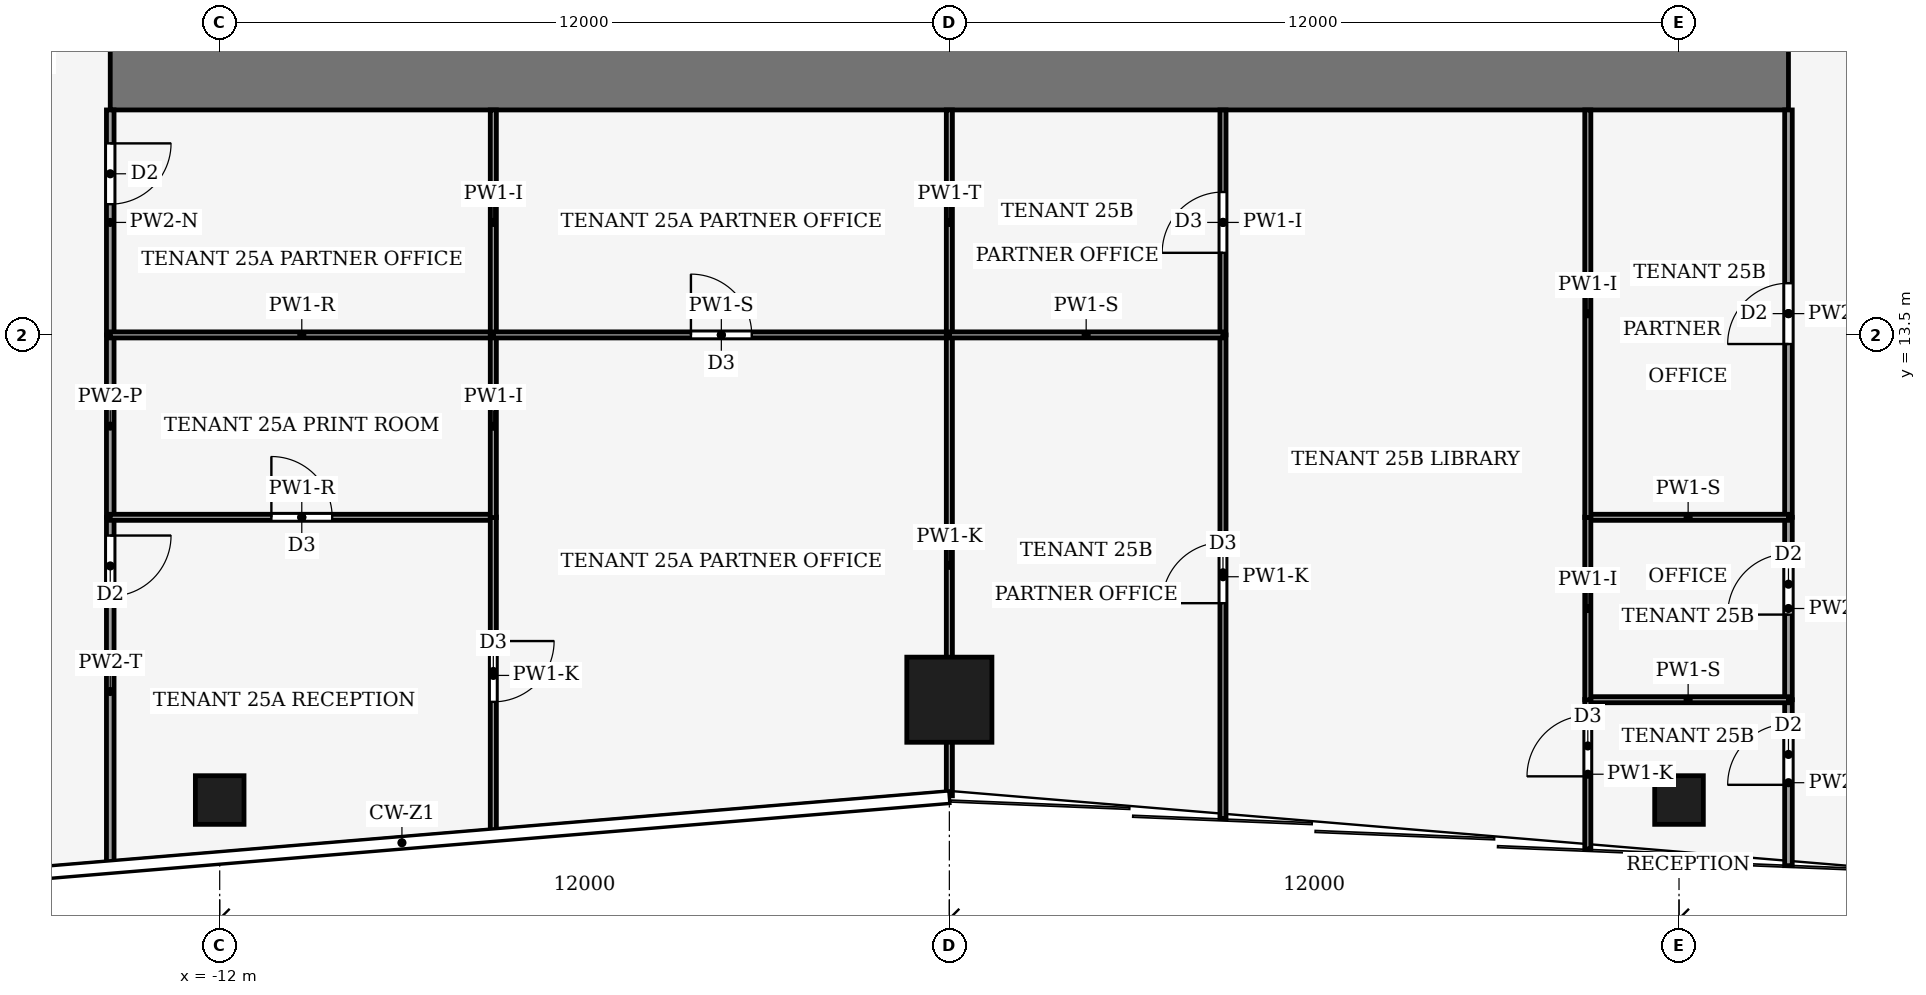
"""IFC4 building model, lengths in metres.
Left out: names, types, materials, properties, quantities, classifications, styles, units other than length and angle.
Written with IfcOpenShell. Run it as: python <this file> out.ifc"""

import sys

from ifc_helpers import new_model, si_unit, direction, frame, frame_2d, origin, origin_2d, place, context, subcontext, project, spatial, rectangle, hollow_rectangle, extrude, element, fill, save


model = new_model("IFC4")
c1 = context("Model", 3, precision=1e-05, world=origin(), true_north=direction((0.0, 1.0)))
c2 = subcontext(c1, "Body", "Model", "MODEL_VIEW")
j1 = project(units=[si_unit("LENGTHUNIT", "METRE"), si_unit("PLANEANGLEUNIT", "RADIAN")], contexts=[c1])
p1 = place(None, origin())
s1 = spatial("IfcSite", under=j1, at=p1, CompositionType="ELEMENT")
p2 = place(p1, origin())
s2 = spatial("IfcBuilding", under=s1, at=p2, CompositionType="ELEMENT")
p3 = place(p2, frame((0.0, 0.0, 110.0)))
s3 = spatial("IfcBuildingStorey", under=s2, at=p3, CompositionType="ELEMENT", Elevation=110.0)
p4 = place(p3, frame((-13.8, 17.8, -0.13), z_axis=(0.0, 0.0, 1.0), x_axis=(1.0, 0.0, 0.0)))
e1 = element("IfcWall", 1, at=p4, inside=s3, PredefinedType="SHEAR", context=c2, shape_type="SweptSolid", body=[
    extrude(rectangle(XDim=27.6, YDim=1.2, at=frame_2d((13.8, 0.0))), origin(), (0.0, 0.0, 1.0), 3.88),
])
p5 = place(p3, frame((0.0, 7.5, 0.0), z_axis=(0.0, 0.0, 1.0), x_axis=(1.0, 0.0, 0.0)))
e2 = element("IfcColumn", 2, at=p5, inside=s3, PredefinedType="COLUMN", context=c2, shape_type="SweptSolid", body=[
    extrude(hollow_rectangle(XDim=1.4, YDim=1.4, WallThickness=0.08, at=origin_2d()), origin(), (0.0, 0.0, 1.0), 4.0),
])
for number, where, z_axis, x_axis in (
    (3, (-12.0, 5.85, 0.0), (0.0, 0.0, 1.0), (1.0, 0.0, 0.0)),
    (4, (12.0, 5.85, 0.0), (0.0, 0.0, 1.0), (1.0, 0.0, 0.0)),
):
    element("IfcColumn", number, at=place(p3, frame(where, z_axis=z_axis, x_axis=x_axis)), inside=s3, PredefinedType="COLUMN", context=c2, shape_type="SweptSolid", body=[
        extrude(hollow_rectangle(XDim=0.8, YDim=0.8, WallThickness=0.04, at=origin_2d()), origin(), (0.0, 0.0, 1.0), 4.0),
    ])
p6 = place(p3, frame((-13.8, 10.5, 0.0), z_axis=(0.0, 0.0, 1.0), x_axis=(0.0, -1.0, 0.0)))
e5 = element("IfcWall", 5, at=p6, inside=s3, PredefinedType="PARTITIONING", context=c2, shape_type="SweptSolid", body=[
    extrude(rectangle(XDim=5.73, YDim=0.125, at=frame_2d((2.865, 0.0))), origin(), (0.0, 0.0, 1.0), 2.92),
])
p7 = place(p6, frame((0.3, 0.0, 0.0)))
e6 = element("IfcOpeningElement", 6, at=p7, cuts=e5, PredefinedType="OPENING", context=c2, shape_type="SweptSolid", body=[
    extrude(rectangle(XDim=1.0, YDim=2.1, at=frame_2d((0.5, 1.05))), frame((0.0, 0.073, 0.0), z_axis=(0.0, -1.0, 0.0), x_axis=(1.0, 0.0, 0.0)), (0.0, 0.0, 1.0), 0.145),
])
p8 = place(p3, frame((-13.8, 10.5, 0.0), z_axis=(0.0, 0.0, 1.0), x_axis=(0.0, 1.0, 0.0)))
e7 = element("IfcWall", 7, at=p8, inside=s3, PredefinedType="PARTITIONING", context=c2, shape_type="SweptSolid", body=[
    extrude(rectangle(XDim=3.0, YDim=0.125, at=frame_2d((1.5, 0.0))), origin(), (0.0, 0.0, 1.0), 3.75),
])
p9 = place(p3, frame((-13.8, 17.2, 0.0), z_axis=(0.0, 0.0, 1.0), x_axis=(0.0, -1.0, 0.0)))
e8 = element("IfcWall", 8, at=p9, inside=s3, PredefinedType="PARTITIONING", context=c2, shape_type="SweptSolid", body=[
    extrude(rectangle(XDim=3.7, YDim=0.125, at=frame_2d((1.85, 0.0))), origin(), (0.0, 0.0, 1.0), 3.02),
])
p10 = place(p9, frame((0.55, 0.0, 0.0)))
e9 = element("IfcOpeningElement", 9, at=p10, cuts=e8, PredefinedType="OPENING", context=c2, shape_type="SweptSolid", body=[
    extrude(rectangle(XDim=1.0, YDim=2.1, at=frame_2d((0.5, 1.05))), frame((0.0, 0.073, 0.0), z_axis=(0.0, -1.0, 0.0), x_axis=(1.0, 0.0, 0.0)), (0.0, 0.0, 1.0), 0.145),
])
p11 = place(p3, frame((13.8, 4.77, 0.0), z_axis=(0.0, 0.0, 1.0), x_axis=(0.0, 1.0, 0.0)))
e10 = element("IfcWall", 10, at=p11, inside=s3, PredefinedType="PARTITIONING", context=c2, shape_type="SweptSolid", body=[
    extrude(rectangle(XDim=2.73, YDim=0.125, at=frame_2d((1.365, 0.0))), origin(), (0.0, 0.0, 1.0), 2.92),
])
p12 = place(p11, frame((1.33, 0.0, 0.0)))
e11 = element("IfcOpeningElement", 11, at=p12, cuts=e10, PredefinedType="OPENING", context=c2, shape_type="SweptSolid", body=[
    extrude(rectangle(XDim=1.0, YDim=2.1, at=frame_2d((0.5, 1.05))), frame((0.0, 0.073, 0.0), z_axis=(0.0, -1.0, 0.0), x_axis=(1.0, 0.0, 0.0)), (0.0, 0.0, 1.0), 0.145),
])
p13 = place(p3, frame((13.8, 7.5, 0.0), z_axis=(0.0, 0.0, 1.0), x_axis=(0.0, 1.0, 0.0)))
e12 = element("IfcWall", 12, at=p13, inside=s3, PredefinedType="PARTITIONING", context=c2, shape_type="SweptSolid", body=[
    extrude(rectangle(XDim=3.0, YDim=0.125, at=frame_2d((1.5, 0.0))), origin(), (0.0, 0.0, 1.0), 3.75),
])
p14 = place(p13, frame((1.4, 0.0, 0.0)))
e13 = element("IfcOpeningElement", 13, at=p14, cuts=e12, PredefinedType="OPENING", context=c2, shape_type="SweptSolid", body=[
    extrude(rectangle(XDim=1.0, YDim=2.1, at=frame_2d((0.5, 1.05))), frame((0.0, 0.073, 0.0), z_axis=(0.0, -1.0, 0.0), x_axis=(1.0, 0.0, 0.0)), (0.0, 0.0, 1.0), 0.145),
])
p15 = place(p3, frame((13.8, 10.5, 0.0), z_axis=(0.0, 0.0, 1.0), x_axis=(0.0, 1.0, 0.0)))
e14 = element("IfcWall", 14, at=p15, inside=s3, PredefinedType="PARTITIONING", context=c2, shape_type="SweptSolid", body=[
    extrude(rectangle(XDim=6.7, YDim=0.125, at=frame_2d((3.35, 0.0))), origin(), (0.0, 0.0, 1.0), 3.02),
])
p16 = place(p15, frame((2.85, 0.0, 0.0)))
e15 = element("IfcOpeningElement", 15, at=p16, cuts=e14, PredefinedType="OPENING", context=c2, shape_type="SweptSolid", body=[
    extrude(rectangle(XDim=1.0, YDim=2.1, at=frame_2d((0.5, 1.05))), frame((0.0, 0.073, 0.0), z_axis=(0.0, -1.0, 0.0), x_axis=(1.0, 0.0, 0.0)), (0.0, 0.0, 1.0), 0.145),
])
p17 = place(p3, frame((-13.8, 10.5, 0.0), z_axis=(0.0, 0.0, 1.0), x_axis=(1.0, 0.0, 0.0)))
e16 = element("IfcWall", 16, at=p17, inside=s3, PredefinedType="PARTITIONING", context=c2, shape_type="SweptSolid", body=[
    extrude(rectangle(XDim=6.3, YDim=0.1, at=frame_2d((3.15, 0.0))), origin(), (0.0, 0.0, 1.0), 3.27),
])
p18 = place(p17, frame((2.65, 0.0, 0.0)))
e17 = element("IfcOpeningElement", 17, at=p18, cuts=e16, PredefinedType="OPENING", context=c2, shape_type="SweptSolid", body=[
    extrude(rectangle(XDim=1.0, YDim=2.1, at=frame_2d((0.5, 1.05))), frame((0.0, 0.06, 0.0), z_axis=(0.0, -1.0, 0.0), x_axis=(1.0, 0.0, 0.0)), (0.0, 0.0, 1.0), 0.12),
])
p19 = place(p3, frame((-7.5, 10.504, 0.0), z_axis=(0.0, 0.0, 1.0), x_axis=(0.0, -1.0, 0.0)))
e18 = element("IfcWall", 18, at=p19, inside=s3, PredefinedType="PARTITIONING", context=c2, shape_type="SweptSolid", body=[
    extrude(rectangle(XDim=5.209, YDim=0.1, at=frame_2d((2.604, 0.0))), origin(), (0.0, 0.0, 1.0), 2.92),
])
p20 = place(p19, frame((2.039, 0.0, 0.0)))
e19 = element("IfcOpeningElement", 19, at=p20, cuts=e18, PredefinedType="OPENING", context=c2, shape_type="SweptSolid", body=[
    extrude(rectangle(XDim=1.0, YDim=2.1, at=frame_2d((0.5, 1.05))), frame((0.0, 0.06, 0.0), z_axis=(0.0, -1.0, 0.0), x_axis=(1.0, 0.0, 0.0)), (0.0, 0.0, 1.0), 0.12),
])
p21 = place(p3, frame((-7.5, 13.5, 0.0), z_axis=(0.0, 0.0, 1.0), x_axis=(-1.0, 0.0, 0.0)))
e20 = element("IfcWall", 20, at=p21, inside=s3, PredefinedType="PARTITIONING", context=c2, shape_type="SweptSolid", body=[
    extrude(rectangle(XDim=6.3, YDim=0.1, at=frame_2d((3.15, 0.0))), origin(), (0.0, 0.0, 1.0), 3.27),
])
p22 = place(p3, frame((-7.5, 10.496, 0.0), z_axis=(0.0, 0.0, 1.0), x_axis=(0.0, 1.0, 0.0)))
e21 = element("IfcWall", 21, at=p22, inside=s3, PredefinedType="PARTITIONING", context=c2, shape_type="SweptSolid", body=[
    extrude(rectangle(XDim=3.004, YDim=0.1, at=frame_2d((1.502, 0.0))), origin(), (0.0, 0.0, 1.0), 3.75),
])
p23 = place(p3, frame((-7.5, 13.5, 0.0), z_axis=(0.0, 0.0, 1.0), x_axis=(0.0, 1.0, 0.0)))
e22 = element("IfcWall", 22, at=p23, inside=s3, PredefinedType="PARTITIONING", context=c2, shape_type="SweptSolid", body=[
    extrude(rectangle(XDim=3.7, YDim=0.1, at=frame_2d((1.85, 0.0))), origin(), (0.0, 0.0, 1.0), 3.75),
])
p24 = place(p3, frame((-7.5, 13.5, 0.0), z_axis=(0.0, 0.0, 1.0), x_axis=(1.0, 0.0, 0.0)))
e23 = element("IfcWall", 23, at=p24, inside=s3, PredefinedType="PARTITIONING", context=c2, shape_type="SweptSolid", body=[
    extrude(rectangle(XDim=7.5, YDim=0.1, at=frame_2d((3.75, 0.0))), origin(), (0.0, 0.0, 1.0), 3.32),
])
p25 = place(p24, frame((3.25, 0.0, 0.0)))
e24 = element("IfcOpeningElement", 24, at=p25, cuts=e23, PredefinedType="OPENING", context=c2, shape_type="SweptSolid", body=[
    extrude(rectangle(XDim=1.0, YDim=2.1, at=frame_2d((0.5, 1.05))), frame((0.0, 0.06, 0.0), z_axis=(0.0, -1.0, 0.0), x_axis=(1.0, 0.0, 0.0)), (0.0, 0.0, 1.0), 0.12),
])
p26 = place(p3, frame((0.0, 5.92, 0.0), z_axis=(0.0, 0.0, 1.0), x_axis=(0.0, 1.0, 0.0)))
e25 = element("IfcWall", 25, at=p26, inside=s3, PredefinedType="PARTITIONING", context=c2, shape_type="SweptSolid", body=[
    extrude(rectangle(XDim=7.58, YDim=0.1, at=frame_2d((3.79, 0.0))), origin(), (0.0, 0.0, 1.0), 2.92),
])
p27 = place(p3, frame((0.0, 13.5, 0.0), z_axis=(0.0, 0.0, 1.0), x_axis=(0.0, 1.0, 0.0)))
e26 = element("IfcWall", 26, at=p27, inside=s3, PredefinedType="PARTITIONING", context=c2, shape_type="SweptSolid", body=[
    extrude(rectangle(XDim=3.7, YDim=0.1, at=frame_2d((1.85, 0.0))), origin(), (0.0, 0.0, 1.0), 3.36),
])
p28 = place(p3, frame((13.8, 7.5, 0.0), z_axis=(0.0, 0.0, 1.0), x_axis=(-1.0, 0.0, 0.0)))
e27 = element("IfcWall", 27, at=p28, inside=s3, PredefinedType="PARTITIONING", context=c2, shape_type="SweptSolid", body=[
    extrude(rectangle(XDim=3.3, YDim=0.1, at=frame_2d((1.65, 0.0))), origin(), (0.0, 0.0, 1.0), 3.32),
])
p29 = place(p3, frame((10.5, 5.045, 0.0), z_axis=(0.0, 0.0, 1.0), x_axis=(0.0, 1.0, 0.0)))
e28 = element("IfcWall", 28, at=p29, inside=s3, PredefinedType="PARTITIONING", context=c2, shape_type="SweptSolid", body=[
    extrude(rectangle(XDim=2.459, YDim=0.1, at=frame_2d((1.229, 0.0))), origin(), (0.0, 0.0, 1.0), 2.92),
])
p30 = place(p29, frame((1.195, 0.0, 0.0)))
e29 = element("IfcOpeningElement", 29, at=p30, cuts=e28, PredefinedType="OPENING", context=c2, shape_type="SweptSolid", body=[
    extrude(rectangle(XDim=1.0, YDim=2.1, at=frame_2d((0.5, 1.05))), frame((0.0, 0.06, 0.0), z_axis=(0.0, -1.0, 0.0), x_axis=(1.0, 0.0, 0.0)), (0.0, 0.0, 1.0), 0.12),
])
p31 = place(p3, frame((13.8, 10.5, 0.0), z_axis=(0.0, 0.0, 1.0), x_axis=(-1.0, 0.0, 0.0)))
e30 = element("IfcWall", 30, at=p31, inside=s3, PredefinedType="PARTITIONING", context=c2, shape_type="SweptSolid", body=[
    extrude(rectangle(XDim=3.3, YDim=0.1, at=frame_2d((1.65, 0.0))), origin(), (0.0, 0.0, 1.0), 3.32),
])
p32 = place(p3, frame((10.5, 10.504, 0.0), z_axis=(0.0, 0.0, 1.0), x_axis=(0.0, -1.0, 0.0)))
e31 = element("IfcWall", 31, at=p32, inside=s3, PredefinedType="PARTITIONING", context=c2, shape_type="SweptSolid", body=[
    extrude(rectangle(XDim=3.008, YDim=0.1, at=frame_2d((1.504, 0.0))), origin(), (0.0, 0.0, 1.0), 3.75),
])
p33 = place(p3, frame((10.5, 17.2, 0.0), z_axis=(0.0, 0.0, 1.0), x_axis=(0.0, -1.0, 0.0)))
e32 = element("IfcWall", 32, at=p33, inside=s3, PredefinedType="PARTITIONING", context=c2, shape_type="SweptSolid", body=[
    extrude(rectangle(XDim=6.704, YDim=0.1, at=frame_2d((3.352, 0.0))), origin(), (0.0, 0.0, 1.0), 3.75),
])
p34 = place(p3, frame((4.5, 5.545, 0.0), z_axis=(0.0, 0.0, 1.0), x_axis=(0.0, 1.0, 0.0)))
e33 = element("IfcWall", 33, at=p34, inside=s3, PredefinedType="PARTITIONING", context=c2, shape_type="SweptSolid", body=[
    extrude(rectangle(XDim=7.955, YDim=0.1, at=frame_2d((3.978, 0.0))), origin(), (0.0, 0.0, 1.0), 2.92),
])
p35 = place(p34, frame((3.542, 0.0, 0.0)))
e34 = element("IfcOpeningElement", 34, at=p35, cuts=e33, PredefinedType="OPENING", context=c2, shape_type="SweptSolid", body=[
    extrude(rectangle(XDim=1.0, YDim=2.1, at=frame_2d((0.5, 1.05))), frame((0.0, 0.06, 0.0), z_axis=(0.0, -1.0, 0.0), x_axis=(1.0, 0.0, 0.0)), (0.0, 0.0, 1.0), 0.12),
])
p36 = place(p3, frame((4.5, 13.5, 0.0), z_axis=(0.0, 0.0, 1.0), x_axis=(0.0, 1.0, 0.0)))
e35 = element("IfcWall", 35, at=p36, inside=s3, PredefinedType="PARTITIONING", context=c2, shape_type="SweptSolid", body=[
    extrude(rectangle(XDim=3.7, YDim=0.1, at=frame_2d((1.85, 0.0))), origin(), (0.0, 0.0, 1.0), 3.75),
])
p37 = place(p36, frame((1.35, 0.0, 0.0)))
e36 = element("IfcOpeningElement", 36, at=p37, cuts=e35, PredefinedType="OPENING", context=c2, shape_type="SweptSolid", body=[
    extrude(rectangle(XDim=1.0, YDim=2.1, at=frame_2d((0.5, 1.05))), frame((0.0, 0.06, 0.0), z_axis=(0.0, -1.0, 0.0), x_axis=(1.0, 0.0, 0.0)), (0.0, 0.0, 1.0), 0.12),
])
p38 = place(p3, frame((4.5, 13.5, 0.0), z_axis=(0.0, 0.0, 1.0), x_axis=(-1.0, 0.0, 0.0)))
e37 = element("IfcWall", 37, at=p38, inside=s3, PredefinedType="PARTITIONING", context=c2, shape_type="SweptSolid", body=[
    extrude(rectangle(XDim=4.5, YDim=0.1, at=frame_2d((2.25, 0.0))), origin(), (0.0, 0.0, 1.0), 3.32),
])
p39 = place(p7, origin())
e38 = element("IfcDoor", 38, at=p39, inside=s3, OperationType="SINGLE_SWING_LEFT", PredefinedType="DOOR", context=c2, shape_type="SweptSolid", body=[
    extrude(rectangle(XDim=1.0, YDim=2.1, at=frame_2d((0.5, 1.05))), frame((0.0, 0.025, 0.0), z_axis=(0.0, -1.0, 0.0), x_axis=(1.0, 0.0, 0.0)), (0.0, 0.0, 1.0), 0.05),
])
fill(e6, e38)
p40 = place(p10, origin())
e39 = element("IfcDoor", 39, at=p40, inside=s3, OperationType="SINGLE_SWING_LEFT", PredefinedType="DOOR", context=c2, shape_type="SweptSolid", body=[
    extrude(rectangle(XDim=1.0, YDim=2.1, at=frame_2d((0.5, 1.05))), frame((0.0, 0.025, 0.0), z_axis=(0.0, -1.0, 0.0), x_axis=(1.0, 0.0, 0.0)), (0.0, 0.0, 1.0), 0.05),
])
fill(e9, e39)
p41 = place(p12, origin())
e40 = element("IfcDoor", 40, at=p41, inside=s3, OperationType="SINGLE_SWING_RIGHT", PredefinedType="DOOR", context=c2, shape_type="SweptSolid", body=[
    extrude(rectangle(XDim=1.0, YDim=2.1, at=frame_2d((0.5, 1.05))), frame((0.0, 0.025, 0.0), z_axis=(0.0, -1.0, 0.0), x_axis=(1.0, 0.0, 0.0)), (0.0, 0.0, 1.0), 0.05),
])
fill(e11, e40)
p42 = place(p14, origin())
e41 = element("IfcDoor", 41, at=p42, inside=s3, OperationType="SINGLE_SWING_RIGHT", PredefinedType="DOOR", context=c2, shape_type="SweptSolid", body=[
    extrude(rectangle(XDim=1.0, YDim=2.1, at=frame_2d((0.5, 1.05))), frame((0.0, 0.025, 0.0), z_axis=(0.0, -1.0, 0.0), x_axis=(1.0, 0.0, 0.0)), (0.0, 0.0, 1.0), 0.05),
])
fill(e13, e41)
p43 = place(p16, origin())
e42 = element("IfcDoor", 42, at=p43, inside=s3, OperationType="SINGLE_SWING_RIGHT", PredefinedType="DOOR", context=c2, shape_type="SweptSolid", body=[
    extrude(rectangle(XDim=1.0, YDim=2.1, at=frame_2d((0.5, 1.05))), frame((0.0, 0.025, 0.0), z_axis=(0.0, -1.0, 0.0), x_axis=(1.0, 0.0, 0.0)), (0.0, 0.0, 1.0), 0.05),
])
fill(e15, e42)
p44 = place(p18, origin())
e43 = element("IfcDoor", 43, at=p44, inside=s3, OperationType="SINGLE_SWING_RIGHT", PredefinedType="DOOR", context=c2, shape_type="SweptSolid", body=[
    extrude(rectangle(XDim=1.0, YDim=2.1, at=frame_2d((0.5, 1.05))), frame((0.0, 0.025, 0.0), z_axis=(0.0, -1.0, 0.0), x_axis=(1.0, 0.0, 0.0)), (0.0, 0.0, 1.0), 0.05),
])
fill(e17, e43)
p45 = place(p20, origin())
e44 = element("IfcDoor", 44, at=p45, inside=s3, OperationType="SINGLE_SWING_LEFT", PredefinedType="DOOR", context=c2, shape_type="SweptSolid", body=[
    extrude(rectangle(XDim=1.0, YDim=2.1, at=frame_2d((0.5, 1.05))), frame((0.0, 0.025, 0.0), z_axis=(0.0, -1.0, 0.0), x_axis=(1.0, 0.0, 0.0)), (0.0, 0.0, 1.0), 0.05),
])
fill(e19, e44)
p46 = place(p25, origin())
e45 = element("IfcDoor", 45, at=p46, inside=s3, OperationType="SINGLE_SWING_RIGHT", PredefinedType="DOOR", context=c2, shape_type="SweptSolid", body=[
    extrude(rectangle(XDim=1.0, YDim=2.1, at=frame_2d((0.5, 1.05))), frame((0.0, 0.025, 0.0), z_axis=(0.0, -1.0, 0.0), x_axis=(1.0, 0.0, 0.0)), (0.0, 0.0, 1.0), 0.05),
])
fill(e24, e45)
p47 = place(p30, origin())
e46 = element("IfcDoor", 46, at=p47, inside=s3, OperationType="SINGLE_SWING_RIGHT", PredefinedType="DOOR", context=c2, shape_type="SweptSolid", body=[
    extrude(rectangle(XDim=1.0, YDim=2.1, at=frame_2d((0.5, 1.05))), frame((0.0, 0.025, 0.0), z_axis=(0.0, -1.0, 0.0), x_axis=(1.0, 0.0, 0.0)), (0.0, 0.0, 1.0), 0.05),
])
fill(e29, e46)
p48 = place(p35, origin())
e47 = element("IfcDoor", 47, at=p48, inside=s3, OperationType="SINGLE_SWING_RIGHT", PredefinedType="DOOR", context=c2, shape_type="SweptSolid", body=[
    extrude(rectangle(XDim=1.0, YDim=2.1, at=frame_2d((0.5, 1.05))), frame((0.0, 0.025, 0.0), z_axis=(0.0, -1.0, 0.0), x_axis=(1.0, 0.0, 0.0)), (0.0, 0.0, 1.0), 0.05),
])
fill(e34, e47)
p49 = place(p37, origin())
e48 = element("IfcDoor", 48, at=p49, inside=s3, OperationType="SINGLE_SWING_LEFT", PredefinedType="DOOR", context=c2, shape_type="SweptSolid", body=[
    extrude(rectangle(XDim=1.0, YDim=2.1, at=frame_2d((0.5, 1.05))), frame((0.0, 0.025, 0.0), z_axis=(0.0, -1.0, 0.0), x_axis=(1.0, 0.0, 0.0)), (0.0, 0.0, 1.0), 0.05),
])
fill(e36, e48)
save(model, sys.argv[1])
